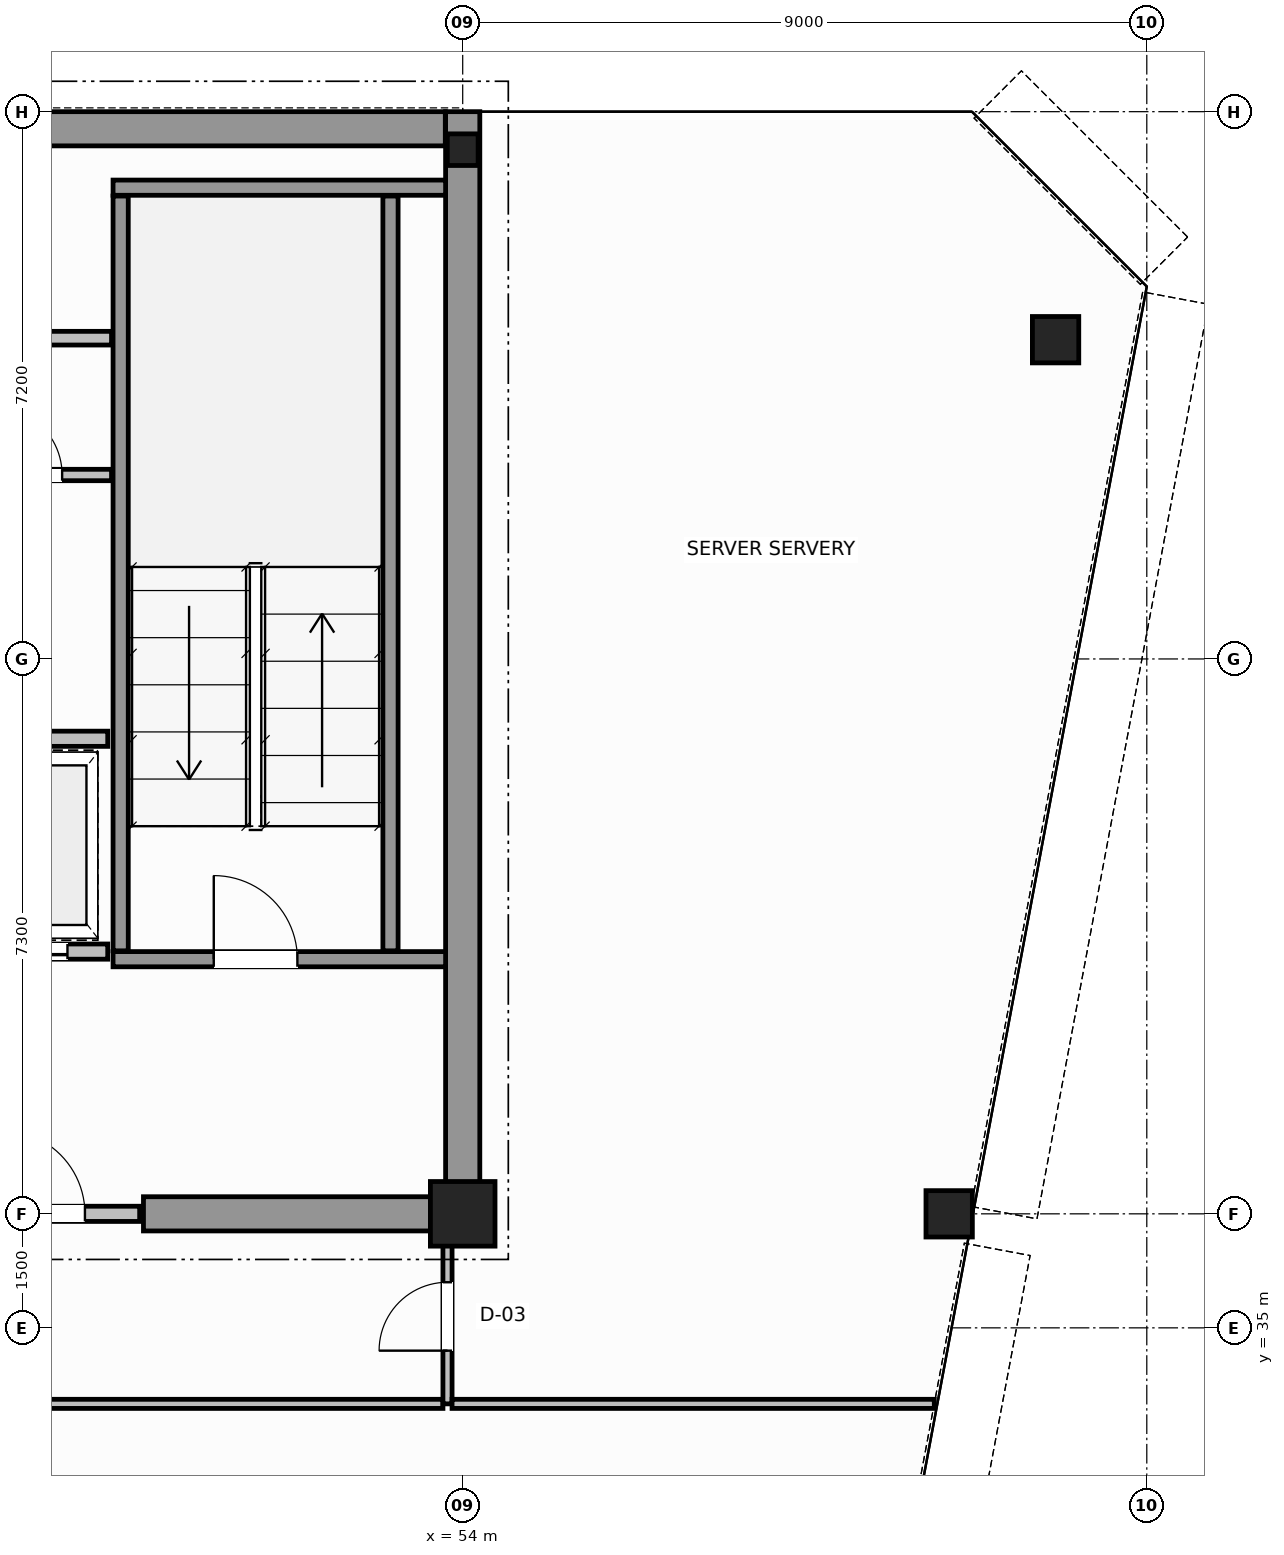
"""IFC4 building model, lengths in metres.
Left out: names, types, materials, properties, quantities, classifications, styles, units other than length and angle.
Written with IfcOpenShell. Run it as: python <this file> out.ifc"""

import sys

from ifc_helpers import new_model, si_unit, direction, frame, frame_2d, origin, origin_2d, place, context, subcontext, project, spatial, rectangle, hollow_circle, i_section, extrude, source, transform, mapped, element, fill, save


model = new_model("IFC4")
c1 = context("Model", 3, precision=1e-05, world=origin(), true_north=direction((0.0, 1.0)))
c2 = subcontext(c1, "Body", "Model", "MODEL_VIEW")
j1 = project(units=[si_unit("LENGTHUNIT", "METRE"), si_unit("PLANEANGLEUNIT", "RADIAN")], contexts=[c1])
p1 = place(None, origin())
s1 = spatial("IfcSite", under=j1, at=p1, CompositionType="ELEMENT")
p2 = place(p1, origin())
s2 = spatial("IfcBuilding", under=s1, at=p2, CompositionType="ELEMENT")
p3 = place(p2, frame((0.0, 0.0, 280.2)))
s3 = spatial("IfcBuildingStorey", under=s2, at=p3, CompositionType="ELEMENT", Elevation=280.2)
m1 = source(origin(), c2, "Body", "SweptSolid", [
    extrude(rectangle(XDim=0.85, YDim=0.85, at=origin_2d()), origin(), (0.0, 0.0, 1.0), 3.8),
])
p4 = place(p3, frame((54.0, 36.5, 0.0), z_axis=(0.0, 0.0, 1.0), x_axis=(1.0, 0.0, 0.0)))
e1 = element("IfcColumn", 1, at=p4, inside=s3, PredefinedType="COLUMN", context=c2, shape_type="MappedRepresentation", body=[
    mapped(m1, transform((0.0, 0.0, 0.0), scale=1.0)),
])
m2 = source(origin(), c2, "Body", "SweptSolid", [
    extrude(i_section(OverallWidth=0.406, OverallDepth=0.416, WebThickness=0.03, FlangeThickness=0.042, FilletRadius=0.015, at=origin_2d()), origin(), (0.0, 0.0, 1.0), 3.8),
])
p5 = place(p3, frame((54.0, 50.5, 0.0), z_axis=(0.0, 0.0, 1.0), x_axis=(1.0, 0.0, 0.0)))
e2 = element("IfcColumn", 2, at=p5, inside=s3, PredefinedType="COLUMN", context=c2, shape_type="MappedRepresentation", body=[
    mapped(m2, transform((0.0, 0.0, 0.0), scale=1.0)),
])
m3 = source(origin(), c2, "Body", "SweptSolid", [
    extrude(hollow_circle(Radius=0.305, WallThickness=0.03, at=origin_2d()), origin(), (0.0, 0.0, 1.0), 3.8),
])
for number, where, z_axis, x_axis in (
    (3, (61.8, 48.0, 0.0), (0.0, 0.0, 1.0), (1.0, 0.0, 0.0)),
    (4, (60.4, 36.5, 0.0), (0.0, 0.0, 1.0), (1.0, 0.0, 0.0)),
):
    element("IfcColumn", number, at=place(p3, frame(where, z_axis=z_axis, x_axis=x_axis)), inside=s3, PredefinedType="COLUMN", context=c2, shape_type="MappedRepresentation", body=[
        mapped(m3, transform((0.0, 0.0, 0.0), scale=1.0)),
    ])
p6 = place(p3, frame((34.002, 50.775, 0.0), z_axis=(0.0, 0.0, 1.0), x_axis=(1.0, 0.0, 0.0)))
e5 = element("IfcWall", 5, at=p6, inside=s3, PredefinedType="SHEAR", context=c2, shape_type="SweptSolid", body=[
    extrude(rectangle(XDim=19.769, YDim=0.45, at=frame_2d((9.885, 0.0))), origin(), (0.0, 0.0, 1.0), 3.8),
])
p7 = place(p3, frame((54.0, 36.5, 0.0), z_axis=(0.0, 0.0, 1.0), x_axis=(0.0, 1.0, 0.0)))
e6 = element("IfcWall", 6, at=p7, inside=s3, PredefinedType="SHEAR", context=c2, shape_type="SweptSolid", body=[
    extrude(rectangle(XDim=14.5, YDim=0.45, at=frame_2d((7.25, 0.0))), origin(), (0.0, 0.0, 1.0), 3.8),
])
p8 = place(p3, frame((49.8, 36.5, 0.0), z_axis=(0.0, 0.0, 1.0), x_axis=(1.0, 0.0, 0.0)))
e7 = element("IfcWall", 7, at=p8, inside=s3, PredefinedType="SHEAR", context=c2, shape_type="SweptSolid", body=[
    extrude(rectangle(XDim=3.955, YDim=0.45, at=frame_2d((1.978, 0.0))), origin(), (0.0, 0.0, 1.0), 2.58),
])
p9 = place(p3, frame((49.4, 39.85, 0.0), z_axis=(0.0, 0.0, 1.0), x_axis=(1.0, 0.0, 0.0)))
e8 = element("IfcWall", 8, at=p9, inside=s3, PredefinedType="SOLIDWALL", context=c2, shape_type="SweptSolid", body=[
    extrude(rectangle(XDim=4.375, YDim=0.2, at=frame_2d((2.188, 0.0))), origin(), (0.0, 0.0, 1.0), 3.8),
])
p10 = place(p9, frame((1.325, 0.0, 0.0)))
e9 = element("IfcOpeningElement", 9, at=p10, cuts=e8, PredefinedType="OPENING", context=c2, shape_type="SweptSolid", body=[
    extrude(rectangle(XDim=1.1, YDim=2.15, at=frame_2d((0.55, 1.075))), frame((0.0, 0.11, 0.0), z_axis=(0.0, -1.0, 0.0), x_axis=(1.0, 0.0, 0.0)), (0.0, 0.0, 1.0), 0.22),
])
p11 = place(p3, frame((49.4, 50.0, 0.0), z_axis=(0.0, 0.0, 1.0), x_axis=(1.0, 0.0, 0.0)))
e10 = element("IfcWall", 10, at=p11, inside=s3, PredefinedType="SOLIDWALL", context=c2, shape_type="SweptSolid", body=[
    extrude(rectangle(XDim=4.375, YDim=0.2, at=frame_2d((2.188, 0.0))), origin(), (0.0, 0.0, 1.0), 3.8),
])
for number, where, z_axis, x_axis in (
    (11, (49.5, 39.96, 0.0), (0.0, 0.0, 1.0), (0.0, 1.0, 0.0)),
    (12, (53.05, 39.96, 0.0), (0.0, 0.0, 1.0), (0.0, 1.0, 0.0)),
):
    element("IfcWall", number, at=place(p3, frame(where, z_axis=z_axis, x_axis=x_axis)), inside=s3, PredefinedType="SOLIDWALL", context=c2, shape_type="SweptSolid", body=[
        extrude(rectangle(XDim=9.93, YDim=0.2, at=frame_2d((4.965, 0.0))), origin(), (0.0, 0.0, 1.0), 3.8),
    ])
p12 = place(p3, frame((47.28, 36.5, 0.0), z_axis=(0.0, 0.0, 1.0), x_axis=(1.0, 0.0, 0.0)))
e13 = element("IfcWall", 13, at=p12, inside=s3, PredefinedType="SOLIDWALL", context=c2, shape_type="SweptSolid", body=[
    extrude(rectangle(XDim=2.47, YDim=0.2, at=frame_2d((1.235, 0.0))), origin(), (0.0, 0.0, 1.0), 2.57),
])
p13 = place(p12, frame((0.65, 0.0, 0.0)))
e14 = element("IfcOpeningElement", 14, at=p13, cuts=e13, PredefinedType="OPENING", context=c2, shape_type="SweptSolid", body=[
    extrude(rectangle(XDim=1.1, YDim=2.15, at=frame_2d((0.55, 1.075))), frame((0.0, 0.11, 0.0), z_axis=(0.0, -1.0, 0.0), x_axis=(1.0, 0.0, 0.0)), (0.0, 0.0, 1.0), 0.22),
])
p14 = place(p3, frame((47.17, 39.95, 0.0), z_axis=(0.0, 0.0, 1.0), x_axis=(1.0, 0.0, 0.0)))
e15 = element("IfcWall", 15, at=p14, inside=s3, PredefinedType="SOLIDWALL", context=c2, shape_type="SweptSolid", body=[
    extrude(rectangle(XDim=2.16, YDim=0.2, at=frame_2d((1.08, 0.0))), origin(), (0.0, 0.0, 1.0), 3.58),
])
p15 = place(p14, frame((0.53, 0.0, 0.0)))
e16 = element("IfcOpeningElement", 16, at=p15, cuts=e15, PredefinedType="OPENING", context=c2, shape_type="SweptSolid", body=[
    extrude(rectangle(XDim=1.1, YDim=2.15, at=frame_2d((0.55, 1.075))), frame((0.0, 0.11, 0.0), z_axis=(0.0, -1.0, 0.0), x_axis=(1.0, 0.0, 0.0)), (0.0, 0.0, 1.0), 0.22),
])
p16 = place(p3, frame((47.17, 42.75, 0.0), z_axis=(0.0, 0.0, 1.0), x_axis=(1.0, 0.0, 0.0)))
e17 = element("IfcWall", 17, at=p16, inside=s3, PredefinedType="SOLIDWALL", context=c2, shape_type="SweptSolid", body=[
    extrude(rectangle(XDim=2.16, YDim=0.2, at=frame_2d((1.08, 0.0))), origin(), (0.0, 0.0, 1.0), 3.58),
])
p17 = place(p3, frame((47.28, 46.22, 0.0), z_axis=(0.0, 0.0, 1.0), x_axis=(1.0, 0.0, 0.0)))
e18 = element("IfcWall", 18, at=p17, inside=s3, PredefinedType="PARTITIONING", context=c2, shape_type="SweptSolid", body=[
    extrude(rectangle(XDim=2.1, YDim=0.15, at=frame_2d((1.05, 0.0))), origin(), (0.0, 0.0, 1.0), 3.58),
])
p18 = place(p17, frame((0.55, 0.0, 0.0)))
e19 = element("IfcOpeningElement", 19, at=p18, cuts=e18, PredefinedType="OPENING", context=c2, shape_type="SweptSolid", body=[
    extrude(rectangle(XDim=0.9, YDim=2.1, at=frame_2d((0.45, 1.05))), frame((0.0, 0.085, 0.0), z_axis=(0.0, -1.0, 0.0), x_axis=(1.0, 0.0, 0.0)), (0.0, 0.0, 1.0), 0.17),
])
p19 = place(p3, frame((18.62, 48.02, 0.0), z_axis=(0.0, 0.0, 1.0), x_axis=(1.0, 0.0, 0.0)))
e20 = element("IfcWall", 20, at=p19, inside=s3, PredefinedType="PLUMBINGWALL", context=c2, shape_type="SweptSolid", body=[
    extrude(rectangle(XDim=30.76, YDim=0.18, at=frame_2d((15.38, 0.0))), origin(), (0.0, 0.0, 1.0), 3.58),
])
p20 = place(p19, frame((1.655, 0.0, 0.0)))
e21 = element("IfcOpeningElement", 21, at=p20, cuts=e20, PredefinedType="OPENING", context=c2, shape_type="SweptSolid", body=[
    extrude(rectangle(XDim=0.9, YDim=2.15, at=frame_2d((0.45, 1.075))), frame((0.0, 0.1, 0.0), z_axis=(0.0, -1.0, 0.0), x_axis=(1.0, 0.0, 0.0)), (0.0, 0.0, 1.0), 0.2),
])
p21 = place(p19, frame((6.03, 0.0, 0.0)))
e22 = element("IfcOpeningElement", 22, at=p21, cuts=e20, PredefinedType="OPENING", context=c2, shape_type="SweptSolid", body=[
    extrude(rectangle(XDim=0.9, YDim=2.15, at=frame_2d((0.45, 1.075))), frame((0.0, 0.1, 0.0), z_axis=(0.0, -1.0, 0.0), x_axis=(1.0, 0.0, 0.0)), (0.0, 0.0, 1.0), 0.2),
])
p22 = place(p19, frame((10.93, 0.0, 0.0)))
e23 = element("IfcOpeningElement", 23, at=p22, cuts=e20, PredefinedType="OPENING", context=c2, shape_type="SweptSolid", body=[
    extrude(rectangle(XDim=0.9, YDim=2.15, at=frame_2d((0.45, 1.075))), frame((0.0, 0.1, 0.0), z_axis=(0.0, -1.0, 0.0), x_axis=(1.0, 0.0, 0.0)), (0.0, 0.0, 1.0), 0.2),
])
p23 = place(p19, frame((16.13, 0.0, 0.0)))
e24 = element("IfcOpeningElement", 24, at=p23, cuts=e20, PredefinedType="OPENING", context=c2, shape_type="SweptSolid", body=[
    extrude(rectangle(XDim=0.9, YDim=2.15, at=frame_2d((0.45, 1.075))), frame((0.0, 0.1, 0.0), z_axis=(0.0, -1.0, 0.0), x_axis=(1.0, 0.0, 0.0)), (0.0, 0.0, 1.0), 0.2),
])
p24 = place(p19, frame((21.73, 0.0, 0.0)))
e25 = element("IfcOpeningElement", 25, at=p24, cuts=e20, PredefinedType="OPENING", context=c2, shape_type="SweptSolid", body=[
    extrude(rectangle(XDim=0.9, YDim=2.15, at=frame_2d((0.45, 1.075))), frame((0.0, 0.1, 0.0), z_axis=(0.0, -1.0, 0.0), x_axis=(1.0, 0.0, 0.0)), (0.0, 0.0, 1.0), 0.2),
])
p25 = place(p19, frame((27.505, 0.0, 0.0)))
e26 = element("IfcOpeningElement", 26, at=p25, cuts=e20, PredefinedType="OPENING", context=c2, shape_type="SweptSolid", body=[
    extrude(rectangle(XDim=0.9, YDim=2.15, at=frame_2d((0.45, 1.075))), frame((0.0, 0.1, 0.0), z_axis=(0.0, -1.0, 0.0), x_axis=(1.0, 0.0, 0.0)), (0.0, 0.0, 1.0), 0.2),
])
p26 = place(p3, frame((37.66, 34.0, 0.0), z_axis=(0.0, 0.0, 1.0), x_axis=(1.0, 0.0, 0.0)))
e27 = element("IfcWall", 27, at=p26, inside=s3, PredefinedType="PARTITIONING", context=c2, shape_type="SweptSolid", body=[
    extrude(rectangle(XDim=16.08, YDim=0.12, at=frame_2d((8.04, 0.0))), origin(), (0.0, 0.0, 1.0), 3.58),
])
p27 = place(p3, frame((53.8, 34.0, 0.0), z_axis=(0.0, 0.0, 1.0), x_axis=(0.0, 1.0, 0.0)))
e28 = element("IfcWall", 28, at=p27, inside=s3, PredefinedType="PARTITIONING", context=c2, shape_type="SweptSolid", body=[
    extrude(rectangle(XDim=2.44, YDim=0.12, at=frame_2d((1.22, 0.0))), origin(), (0.0, 0.0, 1.0), 3.58),
])
p28 = place(p27, frame((0.7, 0.0, 0.0)))
e29 = element("IfcOpeningElement", 29, at=p28, cuts=e28, PredefinedType="OPENING", context=c2, shape_type="SweptSolid", body=[
    extrude(rectangle(XDim=0.9, YDim=2.15, at=frame_2d((0.45, 1.075))), frame((0.0, 0.07, 0.0), z_axis=(0.0, -1.0, 0.0), x_axis=(1.0, 0.0, 0.0)), (0.0, 0.0, 1.0), 0.14),
])
p29 = place(p3, frame((53.86, 34.0, 0.0), z_axis=(0.0, 0.0, 1.0), x_axis=(1.0, 0.0, 0.0)))
e30 = element("IfcWall", 30, at=p29, inside=s3, PredefinedType="PARTITIONING", context=c2, shape_type="SweptSolid", body=[
    extrude(rectangle(XDim=6.344, YDim=0.12, at=frame_2d((3.172, 0.0))), origin(), (0.0, 0.0, 1.0), 3.58),
])
m4 = source(origin(), c2, "Body", "SweptSolid", [
    extrude(rectangle(XDim=1.1, YDim=2.15, at=frame_2d((0.55, 1.075))), frame((0.0, 0.025, 0.0), z_axis=(0.0, -1.0, 0.0), x_axis=(1.0, 0.0, 0.0)), (0.0, 0.0, 1.0), 0.05),
])
p30 = place(p10, origin())
e31 = element("IfcDoor", 31, at=p30, inside=s3, OperationType="SINGLE_SWING_RIGHT", PredefinedType="DOOR", context=c2, shape_type="MappedRepresentation", body=[
    mapped(m4, transform((0.0, 0.0, 0.0), scale=1.0)),
])
fill(e9, e31)
p31 = place(p13, origin())
e32 = element("IfcDoor", 32, at=p31, inside=s3, OperationType="SINGLE_SWING_LEFT", PredefinedType="DOOR", context=c2, shape_type="MappedRepresentation", body=[
    mapped(m4, transform((0.0, 0.0, 0.0), scale=1.0)),
])
fill(e14, e32)
p32 = place(p15, origin())
e33 = element("IfcDoor", 33, at=p32, inside=s3, OperationType="DOUBLE_DOOR_SLIDING", PredefinedType="DOOR", context=c2, shape_type="MappedRepresentation", body=[
    mapped(m4, transform((0.0, 0.0, 0.0), scale=1.0)),
])
fill(e16, e33)
m5 = source(origin(), c2, "Body", "SweptSolid", [
    extrude(rectangle(XDim=0.9, YDim=2.1, at=frame_2d((0.45, 1.05))), frame((0.0, 0.025, 0.0), z_axis=(0.0, -1.0, 0.0), x_axis=(1.0, 0.0, 0.0)), (0.0, 0.0, 1.0), 0.05),
])
p33 = place(p18, origin())
e34 = element("IfcDoor", 34, at=p33, inside=s3, OperationType="SINGLE_SWING_RIGHT", PredefinedType="DOOR", context=c2, shape_type="MappedRepresentation", body=[
    mapped(m5, transform((0.0, 0.0, 0.0), scale=1.0)),
])
fill(e19, e34)
m6 = source(origin(), c2, "Body", "SweptSolid", [
    extrude(rectangle(XDim=0.9, YDim=2.15, at=frame_2d((0.45, 1.075))), frame((0.0, 0.025, 0.0), z_axis=(0.0, -1.0, 0.0), x_axis=(1.0, 0.0, 0.0)), (0.0, 0.0, 1.0), 0.05),
])
p34 = place(p28, origin())
e35 = element("IfcDoor", 35, at=p34, inside=s3, OperationType="SINGLE_SWING_RIGHT", PredefinedType="DOOR", context=c2, shape_type="MappedRepresentation", body=[
    mapped(m6, transform((0.0, 0.0, 0.0), scale=1.0)),
])
fill(e29, e35)
save(model, sys.argv[1])
